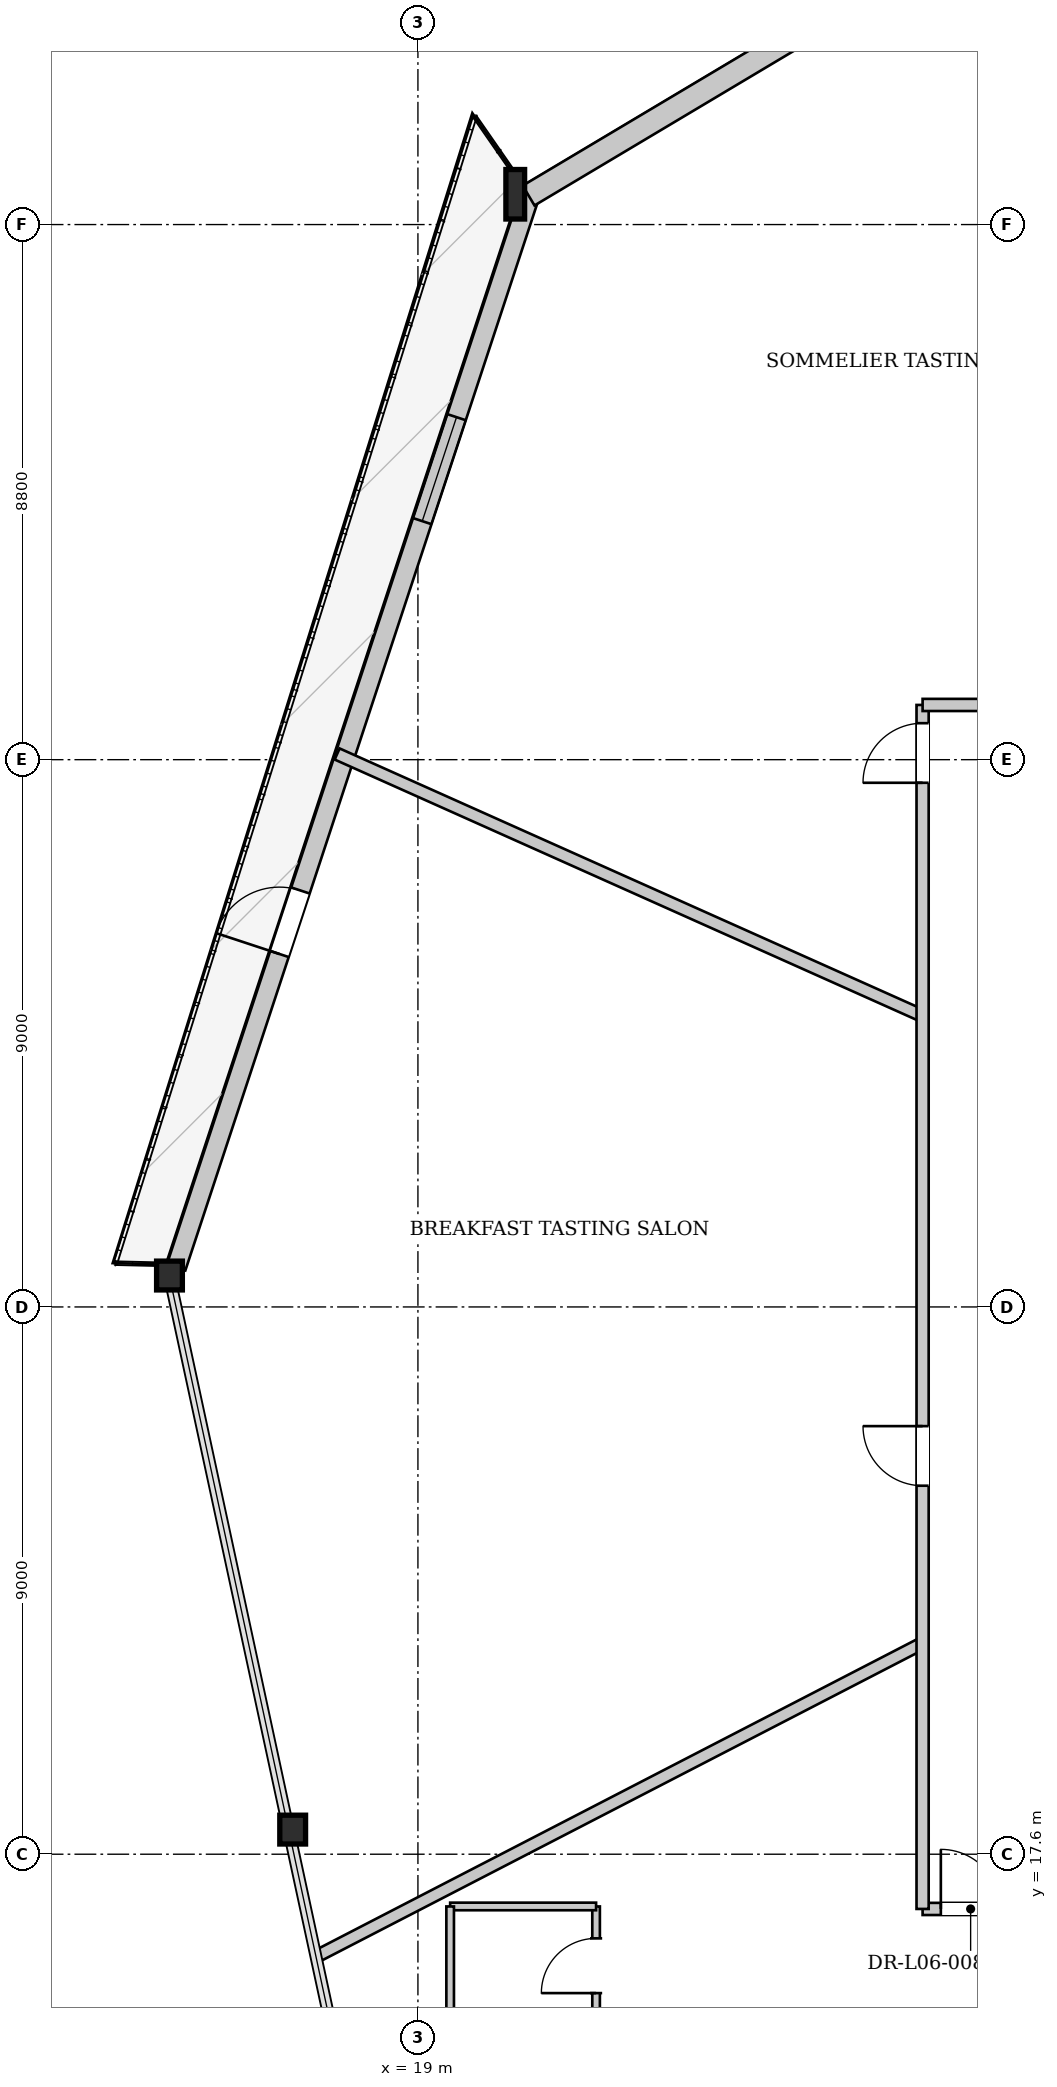
"""IFC4 building model, lengths in metres.
Left out: names, types, materials, properties, quantities, classifications, styles, units other than length and angle.
Written with IfcOpenShell. Run it as: python <this file> out.ifc"""

import sys

from ifc_helpers import new_model, si_unit, direction, frame, frame_2d, origin, origin_2d, place, context, subcontext, project, spatial, rectangle, i_section, extrude, source, transform, mapped, element, fill, save


model = new_model("IFC4")
c1 = context("Model", 3, precision=1e-05, world=origin(), true_north=direction((0.0, 1.0)))
c2 = subcontext(c1, "Body", "Model", "MODEL_VIEW")
j1 = project(units=[si_unit("LENGTHUNIT", "METRE"), si_unit("PLANEANGLEUNIT", "RADIAN")], contexts=[c1])
p1 = place(None, origin())
s1 = spatial("IfcSite", under=j1, at=p1, CompositionType="ELEMENT")
p2 = place(p1, origin())
s2 = spatial("IfcBuilding", under=s1, at=p2, CompositionType="ELEMENT")
p3 = place(p2, frame((0.0, 0.0, 29.3)))
s3 = spatial("IfcBuildingStorey", under=s2, at=p3, CompositionType="ELEMENT", Elevation=29.3)
m1 = source(origin(), c2, "Body", "SweptSolid", [
    extrude(i_section(OverallWidth=0.308, OverallDepth=0.814, WebThickness=0.021, FlangeThickness=0.04, at=origin_2d()), origin(), (0.0, 0.0, 1.0), 3.406),
])
p4 = place(p3, frame((20.723, 45.04, 0.0), z_axis=(-0.07168631532, -0.083442871032, 0.993930761909), x_axis=(0.758520136118, -0.651649601476, 0.0)))
e1 = element("IfcColumn", 1, at=p4, inside=s3, PredefinedType="COLUMN", context=c2, shape_type="MappedRepresentation", body=[
    mapped(m1, transform((0.0, 0.0, 0.0), x_axis=(1.0, 0.0, 0.0), y_axis=(0.0, 1.0, 0.0), z_axis=(0.0, 0.0, 1.0), scale=1.0)),
])
m2 = source(origin(), c2, "Body", "SweptSolid", [
    extrude(i_section(OverallWidth=0.424, OverallDepth=0.474, WebThickness=0.043, FlangeThickness=0.068, at=origin_2d()), origin(), (0.0, 0.0, 1.0), 3.406),
])
p5 = place(p3, frame((14.871, 27.3, 0.0), z_axis=(0.025304377462, -0.10738231569, 0.993895732337), x_axis=(0.973340420784, 0.229365266046, 0.0)))
e2 = element("IfcColumn", 2, at=p5, inside=s3, PredefinedType="COLUMN", context=c2, shape_type="MappedRepresentation", body=[
    mapped(m2, transform((0.0, 0.0, 0.0), x_axis=(1.0, 0.0, 0.0), y_axis=(0.0, 1.0, 0.0), z_axis=(0.0, 0.0, 1.0), scale=1.0)),
])
m3 = source(origin(), c2, "Body", "SweptSolid", [
    extrude(i_section(OverallWidth=0.424, OverallDepth=0.474, WebThickness=0.043, FlangeThickness=0.068, at=origin_2d()), origin(), (0.0, 0.0, 1.0), 3.407),
])
p6 = place(p3, frame((16.838, 18.168, 0.0), z_axis=(0.059978851438, -0.096166808399, 0.993556481707), x_axis=(0.848495215225, 0.529203051522, 0.0)))
e3 = element("IfcColumn", 3, at=p6, inside=s3, PredefinedType="COLUMN", context=c2, shape_type="MappedRepresentation", body=[
    mapped(m3, transform((0.0, 0.0, 0.0), x_axis=(1.0, 0.0, 0.0), y_axis=(0.0, 1.0, 0.0), z_axis=(0.0, 0.0, 1.0), scale=1.0)),
])
p7 = place(p3, frame((15.023, 27.25, 0.0), z_axis=(0.0, 0.0, 1.0), x_axis=(0.313250403321, 0.94967056647, 0.0)))
e4 = element("IfcWall", 4, at=p7, inside=s3, PredefinedType="SOLIDWALL", context=c2, shape_type="SweptSolid", body=[
    extrude(rectangle(XDim=18.681, YDim=0.32, at=frame_2d((9.34, 0.0))), origin(), (0.0, 0.0, 1.0), 2.592),
])
p8 = place(p7, frame((5.428, 0.0, 0.0)))
e5 = element("IfcOpeningElement", 5, at=p8, cuts=e4, PredefinedType="OPENING", context=c2, shape_type="SweptSolid", body=[
    extrude(rectangle(XDim=1.1, YDim=2.3, at=frame_2d((0.55, 1.15))), frame((0.0, 0.17, 0.0), z_axis=(0.0, -1.0, 0.0), x_axis=(1.0, 0.0, 0.0)), (0.0, 0.0, 1.0), 0.34),
])
p9 = place(p7, frame((12.924, 0.0, 0.272)))
e6 = element("IfcOpeningElement", 6, at=p9, cuts=e4, PredefinedType="OPENING", context=c2, shape_type="SweptSolid", body=[
    extrude(rectangle(XDim=1.8, YDim=2.2, at=frame_2d((0.9, 1.1))), frame((0.0, 0.17, 0.0), z_axis=(0.0, -1.0, 0.0), x_axis=(1.0, 0.0, 0.0)), (0.0, 0.0, 1.0), 0.34),
])
p10 = place(p3, frame((20.82, 44.877, 0.0), z_axis=(0.0, 0.0, 1.0), x_axis=(0.858942957999, 0.512071279124, 0.0)))
e7 = element("IfcWall", 7, at=p10, inside=s3, PredefinedType="SOLIDWALL", context=c2, shape_type="SweptSolid", body=[
    extrude(rectangle(XDim=6.684, YDim=0.38, at=frame_2d((3.342, 0.0))), origin(), (0.0, 0.0, 1.0), 2.592),
])
p11 = place(p3, frame((27.3, 31.386, 0.0), z_axis=(0.0, 0.0, 1.0), x_axis=(-0.912828695445, 0.408342714851, 0.0)))
e8 = element("IfcWall", 8, at=p11, inside=s3, PredefinedType="PARTITIONING", context=c2, shape_type="SweptSolid", body=[
    extrude(rectangle(XDim=10.548, YDim=0.2, at=frame_2d((5.274, 0.0))), origin(), (0.0, 0.0, 1.0), 3.3),
])
p12 = place(p3, frame((27.3, 21.071, 0.0), z_axis=(0.0, 0.0, 1.0), x_axis=(-0.888387527234, -0.459094327404, 0.0)))
e9 = element("IfcWall", 9, at=p12, inside=s3, PredefinedType="PARTITIONING", context=c2, shape_type="SweptSolid", body=[
    extrude(rectangle(XDim=11.199, YDim=0.2, at=frame_2d((5.6, 0.0))), origin(), (0.0, 0.0, 1.0), 3.3),
])
p13 = place(p3, frame((21.93, 14.791, 0.0), z_axis=(0.0, 0.0, 1.0), x_axis=(0.0, 1.0, 0.0)))
e10 = element("IfcWall", 10, at=p13, inside=s3, PredefinedType="PARTITIONING", context=c2, shape_type="SweptSolid", body=[
    extrude(rectangle(XDim=1.95, YDim=0.125, at=frame_2d((0.975, 0.0))), origin(), (0.0, 0.0, 1.0), 3.3),
])
p14 = place(p13, frame((0.525, 0.0, 0.0)))
e11 = element("IfcOpeningElement", 11, at=p14, cuts=e10, PredefinedType="OPENING", context=c2, shape_type="SweptSolid", body=[
    extrude(rectangle(XDim=0.9, YDim=2.1, at=frame_2d((0.45, 1.05))), frame((0.0, 0.073, 0.0), z_axis=(0.0, -1.0, 0.0), x_axis=(1.0, 0.0, 0.0)), (0.0, 0.0, 1.0), 0.145),
])
p15 = place(p3, frame((21.93, 16.741, 0.0), z_axis=(0.0, 0.0, 1.0), x_axis=(-1.0, 0.0, 0.0)))
e12 = element("IfcWall", 12, at=p15, inside=s3, PredefinedType="PARTITIONING", context=c2, shape_type="SweptSolid", body=[
    extrude(rectangle(XDim=2.4, YDim=0.125, at=frame_2d((1.2, 0.0))), origin(), (0.0, 0.0, 1.0), 3.3),
])
p16 = place(p3, frame((19.53, 16.741, 0.0), z_axis=(0.0, 0.0, 1.0), x_axis=(0.0, -1.0, 0.0)))
e13 = element("IfcWall", 13, at=p16, inside=s3, PredefinedType="PARTITIONING", context=c2, shape_type="SweptSolid", body=[
    extrude(rectangle(XDim=1.95, YDim=0.125, at=frame_2d((0.975, 0.0))), origin(), (0.0, 0.0, 1.0), 3.3),
])
p17 = place(p3, frame((27.3, 16.7, 0.0), z_axis=(0.0, 0.0, 1.0), x_axis=(1.0, 0.0, 0.0)))
e14 = element("IfcWall", 14, at=p17, inside=s3, PredefinedType="PARTITIONING", context=c2, shape_type="SweptSolid", body=[
    extrude(rectangle(XDim=21.4, YDim=0.2, at=frame_2d((10.7, 0.0))), origin(), (0.0, 0.0, 1.0), 3.3),
])
p18 = place(p17, frame((11.651, 0.0, 0.0)))
e15 = element("IfcOpeningElement", 15, at=p18, cuts=e14, PredefinedType="OPENING", context=c2, shape_type="SweptSolid", body=[
    extrude(rectangle(XDim=0.98, YDim=2.15, at=frame_2d((0.49, 1.075))), frame((0.0, 0.11, 0.0), z_axis=(0.0, -1.0, 0.0), x_axis=(1.0, 0.0, 0.0)), (0.0, 0.0, 1.0), 0.22),
])
p19 = place(p17, frame((20.12, 0.0, 0.0)))
e16 = element("IfcOpeningElement", 16, at=p19, cuts=e14, PredefinedType="OPENING", context=c2, shape_type="SweptSolid", body=[
    extrude(rectangle(XDim=0.98, YDim=2.15, at=frame_2d((0.49, 1.075))), frame((0.0, 0.11, 0.0), z_axis=(0.0, -1.0, 0.0), x_axis=(1.0, 0.0, 0.0)), (0.0, 0.0, 1.0), 0.22),
])
p20 = place(p17, frame((0.3, 0.0, 0.0)))
e17 = element("IfcOpeningElement", 17, at=p20, cuts=e14, PredefinedType="OPENING", context=c2, shape_type="SweptSolid", body=[
    extrude(rectangle(XDim=0.98, YDim=2.15, at=frame_2d((0.49, 1.075))), frame((0.0, 0.11, 0.0), z_axis=(0.0, -1.0, 0.0), x_axis=(1.0, 0.0, 0.0)), (0.0, 0.0, 1.0), 0.22),
])
p21 = place(p3, frame((27.3, 16.7, 0.0), z_axis=(0.0, 0.0, 1.0), x_axis=(0.0, 1.0, 0.0)))
e18 = element("IfcWall", 18, at=p21, inside=s3, PredefinedType="PARTITIONING", context=c2, shape_type="SweptSolid", body=[
    extrude(rectangle(XDim=19.8, YDim=0.2, at=frame_2d((9.9, 0.0))), origin(), (0.0, 0.0, 1.0), 3.3),
])
p22 = place(p21, frame((18.52, 0.0, 0.0)))
e19 = element("IfcOpeningElement", 19, at=p22, cuts=e18, PredefinedType="OPENING", context=c2, shape_type="SweptSolid", body=[
    extrude(rectangle(XDim=0.98, YDim=2.15, at=frame_2d((0.49, 1.075))), frame((0.0, 0.11, 0.0), z_axis=(0.0, -1.0, 0.0), x_axis=(1.0, 0.0, 0.0)), (0.0, 0.0, 1.0), 0.22),
])
p23 = place(p21, frame((6.96, 0.0, 0.0)))
e20 = element("IfcOpeningElement", 20, at=p23, cuts=e18, PredefinedType="OPENING", context=c2, shape_type="SweptSolid", body=[
    extrude(rectangle(XDim=0.98, YDim=2.15, at=frame_2d((0.49, 1.075))), frame((0.0, 0.11, 0.0), z_axis=(0.0, -1.0, 0.0), x_axis=(1.0, 0.0, 0.0)), (0.0, 0.0, 1.0), 0.22),
])
p24 = place(p3, frame((27.3, 36.5, 0.0), z_axis=(0.0, 0.0, 1.0), x_axis=(1.0, 0.0, 0.0)))
e21 = element("IfcWall", 21, at=p24, inside=s3, PredefinedType="PARTITIONING", context=c2, shape_type="SweptSolid", body=[
    extrude(rectangle(XDim=21.4, YDim=0.2, at=frame_2d((10.7, 0.0))), origin(), (0.0, 0.0, 1.0), 3.3),
])
p25 = place(p24, frame((20.12, 0.0, 0.0)))
e22 = element("IfcOpeningElement", 22, at=p25, cuts=e21, PredefinedType="OPENING", context=c2, shape_type="SweptSolid", body=[
    extrude(rectangle(XDim=0.98, YDim=2.15, at=frame_2d((0.49, 1.075))), frame((0.0, 0.11, 0.0), z_axis=(0.0, -1.0, 0.0), x_axis=(1.0, 0.0, 0.0)), (0.0, 0.0, 1.0), 0.22),
])
p26 = place(p24, frame((13.395, 0.0, 0.0)))
e23 = element("IfcOpeningElement", 23, at=p26, cuts=e21, PredefinedType="OPENING", context=c2, shape_type="SweptSolid", body=[
    extrude(rectangle(XDim=0.98, YDim=2.15, at=frame_2d((0.49, 1.075))), frame((0.0, 0.11, 0.0), z_axis=(0.0, -1.0, 0.0), x_axis=(1.0, 0.0, 0.0)), (0.0, 0.0, 1.0), 0.22),
])
m4 = source(origin(), c2, "Body", "SweptSolid", [
    extrude(rectangle(XDim=1.1, YDim=2.3, at=frame_2d((0.55, 1.15))), frame((0.0, 0.025, 0.0), z_axis=(0.0, -1.0, 0.0), x_axis=(1.0, 0.0, 0.0)), (0.0, 0.0, 1.0), 0.05),
])
p27 = place(p8, origin())
e24 = element("IfcDoor", 24, at=p27, inside=s3, OperationType="SINGLE_SWING_LEFT", PredefinedType="DOOR", context=c2, shape_type="MappedRepresentation", body=[
    mapped(m4, transform((0.0, 0.0, 0.0), x_axis=(1.0, 0.0, 0.0), y_axis=(0.0, 1.0, 0.0), z_axis=(0.0, 0.0, 1.0), scale=1.0)),
])
fill(e5, e24)
m5 = source(origin(), c2, "Body", "SweptSolid", [
    extrude(rectangle(XDim=1.8, YDim=2.2, at=frame_2d((0.9, 1.1))), frame((0.0, 0.03, 0.0), z_axis=(0.0, -1.0, 0.0), x_axis=(1.0, 0.0, 0.0)), (0.0, 0.0, 1.0), 0.06),
])
p28 = place(p9, origin())
e25 = element("IfcWindow", 25, at=p28, inside=s3, PartitioningType="SINGLE_PANEL", PredefinedType="WINDOW", context=c2, shape_type="MappedRepresentation", body=[
    mapped(m5, transform((0.0, 0.0, 0.0), x_axis=(1.0, 0.0, 0.0), y_axis=(0.0, 1.0, 0.0), z_axis=(0.0, 0.0, 1.0), scale=1.0)),
])
fill(e6, e25)
m6 = source(origin(), c2, "Body", "SweptSolid", [
    extrude(rectangle(XDim=0.9, YDim=2.1, at=frame_2d((0.45, 1.05))), frame((0.0, 0.025, 0.0), z_axis=(0.0, -1.0, 0.0), x_axis=(1.0, 0.0, 0.0)), (0.0, 0.0, 1.0), 0.05),
])
p29 = place(p14, origin())
e26 = element("IfcDoor", 26, at=p29, inside=s3, OperationType="SINGLE_SWING_LEFT", PredefinedType="DOOR", context=c2, shape_type="MappedRepresentation", body=[
    mapped(m6, transform((0.0, 0.0, 0.0), x_axis=(1.0, 0.0, 0.0), y_axis=(0.0, 1.0, 0.0), z_axis=(0.0, 0.0, 1.0), scale=1.0)),
])
fill(e11, e26)
m7 = source(origin(), c2, "Body", "SweptSolid", [
    extrude(rectangle(XDim=0.98, YDim=2.15, at=frame_2d((0.49, 1.075))), frame((0.0, 0.025, 0.0), z_axis=(0.0, -1.0, 0.0), x_axis=(1.0, 0.0, 0.0)), (0.0, 0.0, 1.0), 0.05),
])
p30 = place(p20, origin())
e27 = element("IfcDoor", 27, at=p30, inside=s3, OperationType="SINGLE_SWING_LEFT", PredefinedType="DOOR", context=c2, shape_type="MappedRepresentation", body=[
    mapped(m7, transform((0.0, 0.0, 0.0), x_axis=(1.0, 0.0, 0.0), y_axis=(0.0, 1.0, 0.0), z_axis=(0.0, 0.0, 1.0), scale=1.0)),
])
fill(e17, e27)
p31 = place(p22, origin())
e28 = element("IfcDoor", 28, at=p31, inside=s3, OperationType="SINGLE_SWING_LEFT", PredefinedType="DOOR", context=c2, shape_type="MappedRepresentation", body=[
    mapped(m7, transform((0.0, 0.0, 0.0), x_axis=(1.0, 0.0, 0.0), y_axis=(0.0, 1.0, 0.0), z_axis=(0.0, 0.0, 1.0), scale=1.0)),
])
fill(e19, e28)
p32 = place(p23, origin())
e29 = element("IfcDoor", 29, at=p32, inside=s3, OperationType="SINGLE_SWING_RIGHT", PredefinedType="DOOR", context=c2, shape_type="MappedRepresentation", body=[
    mapped(m7, transform((0.0, 0.0, 0.0), x_axis=(1.0, 0.0, 0.0), y_axis=(0.0, 1.0, 0.0), z_axis=(0.0, 0.0, 1.0), scale=1.0)),
])
fill(e20, e29)
save(model, sys.argv[1])
